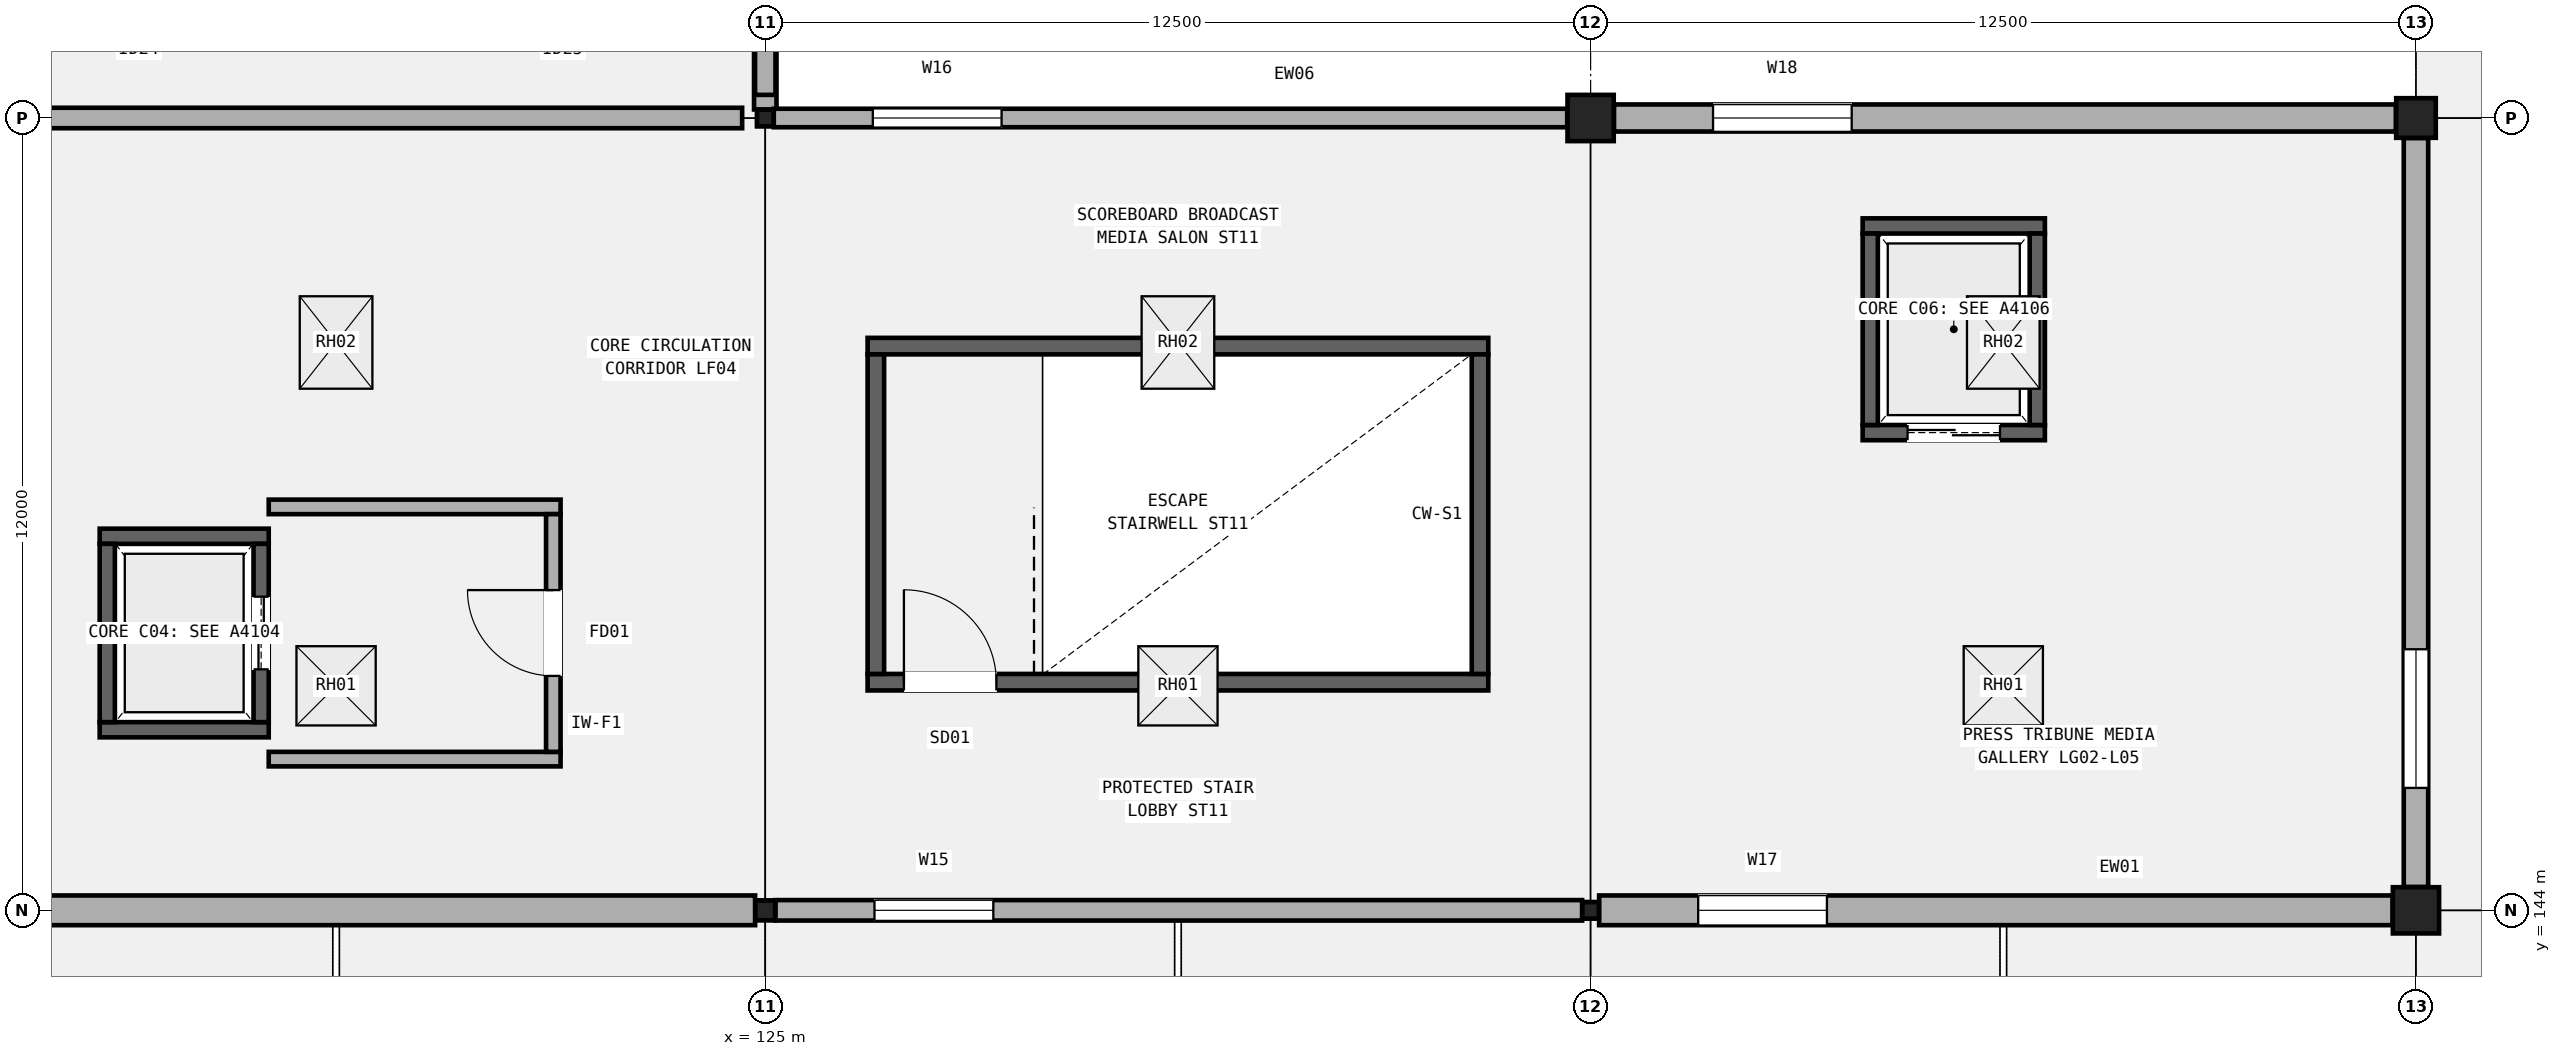
"""IFC4 building model, lengths in metres.
Left out: names, types, materials, properties, quantities, classifications, styles, units other than length and angle.
Written with IfcOpenShell. Run it as: python <this file> out.ifc"""

import sys

from ifc_helpers import new_model, si_unit, direction, frame, frame_2d, origin, origin_2d, place, context, subcontext, project, spatial, rectangle, hollow_rectangle, extrude, element, fill, save


model = new_model("IFC4")
c1 = context("Model", 3, precision=1e-05, world=origin(), true_north=direction((0.0, 1.0)))
c2 = subcontext(c1, "Body", "Model", "MODEL_VIEW")
j1 = project(units=[si_unit("LENGTHUNIT", "METRE"), si_unit("PLANEANGLEUNIT", "RADIAN")], contexts=[c1])
p1 = place(None, origin())
s1 = spatial("IfcSite", under=j1, at=p1, CompositionType="ELEMENT")
p2 = place(p1, origin())
s2 = spatial("IfcBuilding", under=s1, at=p2, CompositionType="ELEMENT")
p3 = place(p2, frame((0.0, 0.0, 25.8)))
s3 = spatial("IfcBuildingStorey", under=s2, at=p3, CompositionType="ELEMENT", Elevation=25.8)
p4 = place(p3, frame((125.0, 144.0, 0.0), z_axis=(0.0, 0.0, 1.0), x_axis=(1.0, 0.0, 0.0)))
e1 = element("IfcColumn", 1, at=p4, inside=s3, PredefinedType="COLUMN", context=c2, shape_type="SweptSolid", body=[
    extrude(hollow_rectangle(XDim=0.3, YDim=0.3, WallThickness=0.012, InnerFilletRadius=0.012, OuterFilletRadius=0.024, at=origin_2d()), origin(), (0.0, 0.0, 1.0), 5.4),
])
for number, where, z_axis, x_axis in (
    (2, (125.0, 156.0, 0.0), (0.0, 0.0, 1.0), (1.0, 0.0, 0.0)),
    (3, (137.5, 144.0, 0.0), (0.0, 0.0, 1.0), (1.0, 0.0, 0.0)),
):
    element("IfcColumn", number, at=place(p3, frame(where, z_axis=z_axis, x_axis=x_axis)), inside=s3, PredefinedType="COLUMN", context=c2, shape_type="SweptSolid", body=[
        extrude(hollow_rectangle(XDim=0.25, YDim=0.25, WallThickness=0.012, InnerFilletRadius=0.012, OuterFilletRadius=0.024, at=origin_2d()), origin(), (0.0, 0.0, 1.0), 5.4),
    ])
for number, where, z_axis, x_axis in (
    (4, (137.5, 156.0, 0.0), (0.0, 0.0, 1.0), (1.0, 0.0, 0.0)),
    (5, (150.0, 144.0, 0.0), (0.0, 0.0, 1.0), (1.0, 0.0, 0.0)),
):
    element("IfcColumn", number, at=place(p3, frame(where, z_axis=z_axis, x_axis=x_axis)), inside=s3, PredefinedType="COLUMN", context=c2, shape_type="SweptSolid", body=[
        extrude(rectangle(XDim=0.7, YDim=0.7, at=origin_2d()), origin(), (0.0, 0.0, 1.0), 5.4),
    ])
p5 = place(p3, frame((150.0, 156.0, 0.0), z_axis=(0.0, 0.0, 1.0), x_axis=(1.0, 0.0, 0.0)))
e6 = element("IfcColumn", 6, at=p5, inside=s3, PredefinedType="COLUMN", context=c2, shape_type="SweptSolid", body=[
    extrude(rectangle(XDim=0.6, YDim=0.6, at=origin_2d()), origin(), (0.0, 0.0, 1.0), 5.4),
])
p6 = place(p3, frame((112.179, 144.0, 0.0), z_axis=(0.0, 0.0, 1.0), x_axis=(1.0, 0.0, 0.0)))
e7 = element("IfcWall", 7, at=p6, inside=s3, PredefinedType="SOLIDWALL", context=c2, shape_type="SweptSolid", body=[
    extrude(rectangle(XDim=12.667, YDim=0.45, at=frame_2d((6.333, 0.0))), origin(), (0.0, 0.0, 1.0), 4.13),
])
p7 = place(p3, frame((125.0, 156.129, 0.0), z_axis=(0.0, 0.0, 1.0), x_axis=(0.0, 1.0, 0.0)))
e8 = element("IfcWall", 8, at=p7, inside=s3, PredefinedType="SOLIDWALL", context=c2, shape_type="SweptSolid", body=[
    extrude(rectangle(XDim=11.517, YDim=0.34, at=frame_2d((5.759, 0.0))), origin(), (0.0, 0.0, 1.0), 4.452),
])
p8 = place(p7, frame((2.391, 0.0, 0.95)))
e9 = element("IfcOpeningElement", 9, at=p8, cuts=e8, PredefinedType="OPENING", context=c2, shape_type="SweptSolid", body=[
    extrude(rectangle(XDim=1.8, YDim=2.15, at=frame_2d((0.9, 1.075))), frame((0.0, 0.18, 0.0), z_axis=(0.0, -1.0, 0.0), x_axis=(1.0, 0.0, 0.0)), (0.0, 0.0, 1.0), 0.36),
])
p9 = place(p3, frame((125.154, 144.0, 0.0), z_axis=(0.0, 0.0, 1.0), x_axis=(1.0, 0.0, 0.0)))
e10 = element("IfcWall", 10, at=p9, inside=s3, PredefinedType="SOLIDWALL", context=c2, shape_type="SweptSolid", body=[
    extrude(rectangle(XDim=12.217, YDim=0.31, at=frame_2d((6.108, 0.0))), origin(), (0.0, 0.0, 1.0), 4.13),
])
p10 = place(p9, frame((1.5, 0.0, 0.95)))
e11 = element("IfcOpeningElement", 11, at=p10, cuts=e10, PredefinedType="OPENING", context=c2, shape_type="SweptSolid", body=[
    extrude(rectangle(XDim=1.8, YDim=2.55, at=frame_2d((0.9, 1.275))), frame((0.0, 0.165, 0.0), z_axis=(0.0, -1.0, 0.0), x_axis=(1.0, 0.0, 0.0)), (0.0, 0.0, 1.0), 0.33),
])
p11 = place(p3, frame((125.129, 156.0, 0.0), z_axis=(0.0, 0.0, 1.0), x_axis=(1.0, 0.0, 0.0)))
e12 = element("IfcWall", 12, at=p11, inside=s3, PredefinedType="SOLIDWALL", context=c2, shape_type="SweptSolid", body=[
    extrude(rectangle(XDim=12.017, YDim=0.28, at=frame_2d((6.009, 0.0))), origin(), (0.0, 0.0, 1.0), 4.452),
])
p12 = place(p11, frame((1.5, 0.0, 0.95)))
e13 = element("IfcOpeningElement", 13, at=p12, cuts=e12, PredefinedType="OPENING", context=c2, shape_type="SweptSolid", body=[
    extrude(rectangle(XDim=1.95, YDim=1.9, at=frame_2d((0.975, 0.95))), frame((0.0, 0.15, 0.0), z_axis=(0.0, -1.0, 0.0), x_axis=(1.0, 0.0, 0.0)), (0.0, 0.0, 1.0), 0.3),
])
p13 = place(p3, frame((137.629, 144.0, 0.0), z_axis=(0.0, 0.0, 1.0), x_axis=(1.0, 0.0, 0.0)))
e14 = element("IfcWall", 14, at=p13, inside=s3, PredefinedType="SOLIDWALL", context=c2, shape_type="SweptSolid", body=[
    extrude(rectangle(XDim=12.017, YDim=0.45, at=frame_2d((6.009, 0.0))), origin(), (0.0, 0.0, 1.0), 4.13),
])
p14 = place(p13, frame((1.5, 0.0, 0.95)))
e15 = element("IfcOpeningElement", 15, at=p14, cuts=e14, PredefinedType="OPENING", context=c2, shape_type="SweptSolid", body=[
    extrude(rectangle(XDim=1.95, YDim=2.35, at=frame_2d((0.975, 1.175))), frame((0.0, 0.235, 0.0), z_axis=(0.0, -1.0, 0.0), x_axis=(1.0, 0.0, 0.0)), (0.0, 0.0, 1.0), 0.47),
])
p15 = place(p3, frame((137.854, 156.0, 0.0), z_axis=(0.0, 0.0, 1.0), x_axis=(1.0, 0.0, 0.0)))
e16 = element("IfcWall", 16, at=p15, inside=s3, PredefinedType="SOLIDWALL", context=c2, shape_type="SweptSolid", body=[
    extrude(rectangle(XDim=11.842, YDim=0.41, at=frame_2d((5.921, 0.0))), origin(), (0.0, 0.0, 1.0), 4.34),
])
p16 = place(p15, frame((1.5, 0.0, 0.95)))
e17 = element("IfcOpeningElement", 17, at=p16, cuts=e16, PredefinedType="OPENING", context=c2, shape_type="SweptSolid", body=[
    extrude(rectangle(XDim=2.1, YDim=1.85, at=frame_2d((1.05, 0.925))), frame((0.0, 0.215, 0.0), z_axis=(0.0, -1.0, 0.0), x_axis=(1.0, 0.0, 0.0)), (0.0, 0.0, 1.0), 0.43),
])
p17 = place(p3, frame((150.0, 144.354, 0.0), z_axis=(0.0, 0.0, 1.0), x_axis=(0.0, 1.0, 0.0)))
e18 = element("IfcWall", 18, at=p17, inside=s3, PredefinedType="SOLIDWALL", context=c2, shape_type="SweptSolid", body=[
    extrude(rectangle(XDim=11.342, YDim=0.37, at=frame_2d((5.671, 0.0))), origin(), (0.0, 0.0, 1.0), 4.34),
])
p18 = place(p17, frame((1.5, 0.0, 0.95)))
e19 = element("IfcOpeningElement", 19, at=p18, cuts=e18, PredefinedType="OPENING", context=c2, shape_type="SweptSolid", body=[
    extrude(rectangle(XDim=2.1, YDim=2.25, at=frame_2d((1.05, 1.125))), frame((0.0, 0.195, 0.0), z_axis=(0.0, -1.0, 0.0), x_axis=(1.0, 0.0, 0.0)), (0.0, 0.0, 1.0), 0.39),
])
p19 = place(p3, frame((112.35, 156.0, 5.4), z_axis=(0.0, 0.0, 1.0), x_axis=(1.0, 0.0, 0.0)))
e20 = element("IfcWall", 20, at=p19, inside=s3, PredefinedType="SOLIDWALL", context=c2, shape_type="SweptSolid", body=[
    extrude(rectangle(XDim=12.3, YDim=0.31, at=frame_2d((6.15, 0.0))), origin(), (0.0, 0.0, 1.0), 0.88),
])
p20 = place(p3, frame((125.0, 156.35, 5.4), z_axis=(0.0, 0.0, 1.0), x_axis=(0.0, 1.0, 0.0)))
e21 = element("IfcWall", 21, at=p20, inside=s3, PredefinedType="SOLIDWALL", context=c2, shape_type="SweptSolid", body=[
    extrude(rectangle(XDim=11.3, YDim=0.31, at=frame_2d((5.65, 0.0))), origin(), (0.0, 0.0, 1.0), 0.88),
])
p21 = place(p3, frame((126.55, 147.455, 0.0), z_axis=(0.0, 0.0, 1.0), x_axis=(1.0, 0.0, 0.0)))
e22 = element("IfcWall", 22, at=p21, inside=s3, PredefinedType="SHEAR", context=c2, shape_type="SweptSolid", body=[
    extrude(rectangle(XDim=9.4, YDim=0.25, at=frame_2d((4.7, 0.0))), origin(), (0.0, 0.0, 1.0), 5.04),
])
p22 = place(p21, frame((0.55, 0.0, 0.0)))
e23 = element("IfcOpeningElement", 23, at=p22, cuts=e22, PredefinedType="OPENING", context=c2, shape_type="SweptSolid", body=[
    extrude(rectangle(XDim=1.4, YDim=2.15, at=frame_2d((0.7, 1.075))), frame((0.0, 0.135, 0.0), z_axis=(0.0, -1.0, 0.0), x_axis=(1.0, 0.0, 0.0)), (0.0, 0.0, 1.0), 0.27),
])
p23 = place(p3, frame((126.55, 152.545, 0.0), z_axis=(0.0, 0.0, 1.0), x_axis=(1.0, 0.0, 0.0)))
e24 = element("IfcWall", 24, at=p23, inside=s3, PredefinedType="SHEAR", context=c2, shape_type="SweptSolid", body=[
    extrude(rectangle(XDim=9.4, YDim=0.25, at=frame_2d((4.7, 0.0))), origin(), (0.0, 0.0, 1.0), 5.04),
])
for number, where, z_axis, x_axis in (
    (25, (126.675, 147.58, 0.0), (0.0, 0.0, 1.0), (0.0, 1.0, 0.0)),
    (26, (135.825, 147.58, 0.0), (0.0, 0.0, 1.0), (0.0, 1.0, 0.0)),
):
    element("IfcWall", number, at=place(p3, frame(where, z_axis=z_axis, x_axis=x_axis)), inside=s3, PredefinedType="SHEAR", context=c2, shape_type="SweptSolid", body=[
        extrude(rectangle(XDim=4.84, YDim=0.25, at=frame_2d((2.42, 0.0))), origin(), (0.0, 0.0, 1.0), 5.04),
    ])
for number, where, z_axis, x_axis in (
    (27, (114.92, 146.735, 0.0), (0.0, 0.0, 1.0), (1.0, 0.0, 0.0)),
    (28, (114.92, 149.665, 0.0), (0.0, 0.0, 1.0), (1.0, 0.0, 0.0)),
):
    element("IfcWall", number, at=place(p3, frame(where, z_axis=z_axis, x_axis=x_axis)), inside=s3, PredefinedType="SHEAR", context=c2, shape_type="SweptSolid", body=[
        extrude(rectangle(XDim=2.56, YDim=0.23, at=frame_2d((1.28, 0.0))), origin(), (0.0, 0.0, 1.0), 5.04),
    ])
p24 = place(p3, frame((115.035, 146.85, 0.0), z_axis=(0.0, 0.0, 1.0), x_axis=(0.0, 1.0, 0.0)))
e29 = element("IfcWall", 29, at=p24, inside=s3, PredefinedType="SHEAR", context=c2, shape_type="SweptSolid", body=[
    extrude(rectangle(XDim=2.7, YDim=0.23, at=frame_2d((1.35, 0.0))), origin(), (0.0, 0.0, 1.0), 5.04),
])
p25 = place(p3, frame((117.365, 146.85, 0.0), z_axis=(0.0, 0.0, 1.0), x_axis=(0.0, 1.0, 0.0)))
e30 = element("IfcWall", 30, at=p25, inside=s3, PredefinedType="SHEAR", context=c2, shape_type="SweptSolid", body=[
    extrude(rectangle(XDim=2.7, YDim=0.23, at=frame_2d((1.35, 0.0))), origin(), (0.0, 0.0, 1.0), 5.04),
])
p26 = place(p25, frame((0.8, 0.0, 0.0)))
e31 = element("IfcOpeningElement", 31, at=p26, cuts=e30, PredefinedType="OPENING", context=c2, shape_type="SweptSolid", body=[
    extrude(rectangle(XDim=1.1, YDim=2.15, at=frame_2d((0.55, 1.075))), frame((0.0, 0.125, 0.0), z_axis=(0.0, -1.0, 0.0), x_axis=(1.0, 0.0, 0.0)), (0.0, 0.0, 1.0), 0.25),
])
for number, where, z_axis, x_axis in (
    (32, (117.48, 146.29, 0.0), (0.0, 0.0, 1.0), (1.0, 0.0, 0.0)),
    (33, (117.48, 150.11, 0.0), (0.0, 0.0, 1.0), (1.0, 0.0, 0.0)),
):
    element("IfcWall", number, at=place(p3, frame(where, z_axis=z_axis, x_axis=x_axis)), inside=s3, PredefinedType="SOLIDWALL", context=c2, shape_type="SweptSolid", body=[
        extrude(rectangle(XDim=4.42, YDim=0.22, at=frame_2d((2.21, 0.0))), origin(), (0.0, 0.0, 1.0), 4.35),
    ])
p27 = place(p3, frame((121.79, 146.4, 0.0), z_axis=(0.0, 0.0, 1.0), x_axis=(0.0, 1.0, 0.0)))
e34 = element("IfcWall", 34, at=p27, inside=s3, PredefinedType="SOLIDWALL", context=c2, shape_type="SweptSolid", body=[
    extrude(rectangle(XDim=3.6, YDim=0.22, at=frame_2d((1.8, 0.0))), origin(), (0.0, 0.0, 1.0), 4.35),
])
p28 = place(p27, frame((1.15, 0.0, 0.0)))
e35 = element("IfcOpeningElement", 35, at=p28, cuts=e34, PredefinedType="OPENING", context=c2, shape_type="SweptSolid", body=[
    extrude(rectangle(XDim=1.3, YDim=2.15, at=frame_2d((0.65, 1.075))), frame((0.0, 0.12, 0.0), z_axis=(0.0, -1.0, 0.0), x_axis=(1.0, 0.0, 0.0)), (0.0, 0.0, 1.0), 0.24),
])
p29 = place(p3, frame((141.62, 151.235, 0.0), z_axis=(0.0, 0.0, 1.0), x_axis=(1.0, 0.0, 0.0)))
e36 = element("IfcWall", 36, at=p29, inside=s3, PredefinedType="SHEAR", context=c2, shape_type="SweptSolid", body=[
    extrude(rectangle(XDim=2.76, YDim=0.23, at=frame_2d((1.38, 0.0))), origin(), (0.0, 0.0, 1.0), 5.04),
])
p30 = place(p29, frame((0.68, 0.0, 0.0)))
e37 = element("IfcOpeningElement", 37, at=p30, cuts=e36, PredefinedType="OPENING", context=c2, shape_type="SweptSolid", body=[
    extrude(rectangle(XDim=1.4, YDim=2.25, at=frame_2d((0.7, 1.125))), frame((0.0, 0.125, 0.0), z_axis=(0.0, -1.0, 0.0), x_axis=(1.0, 0.0, 0.0)), (0.0, 0.0, 1.0), 0.25),
])
p31 = place(p3, frame((141.62, 154.365, 0.0), z_axis=(0.0, 0.0, 1.0), x_axis=(1.0, 0.0, 0.0)))
e38 = element("IfcWall", 38, at=p31, inside=s3, PredefinedType="SHEAR", context=c2, shape_type="SweptSolid", body=[
    extrude(rectangle(XDim=2.76, YDim=0.23, at=frame_2d((1.38, 0.0))), origin(), (0.0, 0.0, 1.0), 5.04),
])
for number, where, z_axis, x_axis in (
    (39, (141.735, 151.35, 0.0), (0.0, 0.0, 1.0), (0.0, 1.0, 0.0)),
    (40, (144.265, 151.35, 0.0), (0.0, 0.0, 1.0), (0.0, 1.0, 0.0)),
):
    element("IfcWall", number, at=place(p3, frame(where, z_axis=z_axis, x_axis=x_axis)), inside=s3, PredefinedType="SHEAR", context=c2, shape_type="SweptSolid", body=[
        extrude(rectangle(XDim=2.9, YDim=0.23, at=frame_2d((1.45, 0.0))), origin(), (0.0, 0.0, 1.0), 5.04),
    ])
p32 = place(p10, origin())
e41 = element("IfcWindow", 41, at=p32, inside=s3, PartitioningType="SINGLE_PANEL", PredefinedType="WINDOW", context=c2, shape_type="SweptSolid", body=[
    extrude(rectangle(XDim=1.8, YDim=2.55, at=frame_2d((0.9, 1.275))), frame((0.0, 0.03, 0.0), z_axis=(0.0, -1.0, 0.0), x_axis=(1.0, 0.0, 0.0)), (0.0, 0.0, 1.0), 0.06),
])
fill(e11, e41)
p33 = place(p12, origin())
e42 = element("IfcWindow", 42, at=p33, inside=s3, PartitioningType="SINGLE_PANEL", PredefinedType="WINDOW", context=c2, shape_type="SweptSolid", body=[
    extrude(rectangle(XDim=1.95, YDim=1.9, at=frame_2d((0.975, 0.95))), frame((0.0, 0.03, 0.0), z_axis=(0.0, -1.0, 0.0), x_axis=(1.0, 0.0, 0.0)), (0.0, 0.0, 1.0), 0.06),
])
fill(e13, e42)
p34 = place(p14, origin())
e43 = element("IfcWindow", 43, at=p34, inside=s3, PartitioningType="SINGLE_PANEL", PredefinedType="WINDOW", context=c2, shape_type="SweptSolid", body=[
    extrude(rectangle(XDim=1.95, YDim=2.35, at=frame_2d((0.975, 1.175))), frame((0.0, 0.03, 0.0), z_axis=(0.0, -1.0, 0.0), x_axis=(1.0, 0.0, 0.0)), (0.0, 0.0, 1.0), 0.06),
])
fill(e15, e43)
p35 = place(p16, origin())
e44 = element("IfcWindow", 44, at=p35, inside=s3, PartitioningType="SINGLE_PANEL", PredefinedType="WINDOW", context=c2, shape_type="SweptSolid", body=[
    extrude(rectangle(XDim=2.1, YDim=1.85, at=frame_2d((1.05, 0.925))), frame((0.0, 0.03, 0.0), z_axis=(0.0, -1.0, 0.0), x_axis=(1.0, 0.0, 0.0)), (0.0, 0.0, 1.0), 0.06),
])
fill(e17, e44)
p36 = place(p18, origin())
e45 = element("IfcWindow", 45, at=p36, inside=s3, PartitioningType="SINGLE_PANEL", PredefinedType="WINDOW", context=c2, shape_type="SweptSolid", body=[
    extrude(rectangle(XDim=2.1, YDim=2.25, at=frame_2d((1.05, 1.125))), frame((0.0, 0.03, 0.0), z_axis=(0.0, -1.0, 0.0), x_axis=(1.0, 0.0, 0.0)), (0.0, 0.0, 1.0), 0.06),
])
fill(e19, e45)
p37 = place(p2, frame((0.0, 0.0, 31.2)))
p38 = place(p37, frame((0.0, 0.0, -0.36)))
p39 = place(p38, frame((118.5, 147.4, 0.0)))
p40 = place(p39, frame((0.0, 0.0, 0.31)))
e46 = element("IfcDoor", 46, at=p40, inside=s3, OperationType="SINGLE_SWING_LEFT", PredefinedType="TRAPDOOR", context=c2, shape_type="SweptSolid", body=[
    extrude(rectangle(XDim=1.2, YDim=1.2, at=origin_2d()), origin(), (0.0, 0.0, 1.0), 0.05),
])
p41 = place(p38, frame((118.5, 152.6, 0.0)))
p42 = place(p41, frame((0.0, 0.0, 0.31)))
e47 = element("IfcDoor", 47, at=p42, inside=s3, OperationType="SINGLE_SWING_LEFT", PredefinedType="TRAPDOOR", context=c2, shape_type="SweptSolid", body=[
    extrude(rectangle(XDim=1.4, YDim=1.1, at=origin_2d()), origin(), (0.0, 0.0, 1.0), 0.05),
])
p43 = place(p37, frame((0.0, 0.0, -0.36)))
p44 = place(p43, frame((131.25, 147.4, 0.0)))
p45 = place(p44, frame((0.0, 0.0, 0.31)))
e48 = element("IfcDoor", 48, at=p45, inside=s3, OperationType="SINGLE_SWING_LEFT", PredefinedType="TRAPDOOR", context=c2, shape_type="SweptSolid", body=[
    extrude(rectangle(XDim=1.2, YDim=1.2, at=origin_2d()), origin(), (0.0, 0.0, 1.0), 0.05),
])
p46 = place(p43, frame((131.25, 152.6, 0.0)))
p47 = place(p46, frame((0.0, 0.0, 0.31)))
e49 = element("IfcDoor", 49, at=p47, inside=s3, OperationType="SINGLE_SWING_LEFT", PredefinedType="TRAPDOOR", context=c2, shape_type="SweptSolid", body=[
    extrude(rectangle(XDim=1.4, YDim=1.1, at=origin_2d()), origin(), (0.0, 0.0, 1.0), 0.05),
])
p48 = place(p37, frame((0.0, 0.0, -0.36)))
p49 = place(p48, frame((143.75, 147.4, 0.0)))
p50 = place(p49, frame((0.0, 0.0, 0.31)))
e50 = element("IfcDoor", 50, at=p50, inside=s3, OperationType="SINGLE_SWING_LEFT", PredefinedType="TRAPDOOR", context=c2, shape_type="SweptSolid", body=[
    extrude(rectangle(XDim=1.2, YDim=1.2, at=origin_2d()), origin(), (0.0, 0.0, 1.0), 0.05),
])
p51 = place(p48, frame((143.75, 152.6, 0.0)))
p52 = place(p51, frame((0.0, 0.0, 0.31)))
e51 = element("IfcDoor", 51, at=p52, inside=s3, OperationType="SINGLE_SWING_LEFT", PredefinedType="TRAPDOOR", context=c2, shape_type="SweptSolid", body=[
    extrude(rectangle(XDim=1.4, YDim=1.1, at=origin_2d()), origin(), (0.0, 0.0, 1.0), 0.05),
])
p53 = place(p22, origin())
e52 = element("IfcDoor", 52, at=p53, inside=s3, OperationType="SINGLE_SWING_LEFT", PredefinedType="DOOR", context=c2, shape_type="SweptSolid", body=[
    extrude(rectangle(XDim=1.4, YDim=2.15, at=frame_2d((0.7, 1.075))), frame((0.0, 0.025, 0.0), z_axis=(0.0, -1.0, 0.0), x_axis=(1.0, 0.0, 0.0)), (0.0, 0.0, 1.0), 0.05),
])
fill(e23, e52)
p54 = place(p26, origin())
e53 = element("IfcDoor", 53, at=p54, inside=s3, OperationType="DOUBLE_DOOR_SLIDING", PredefinedType="DOOR", context=c2, shape_type="SweptSolid", body=[
    extrude(rectangle(XDim=1.1, YDim=2.15, at=frame_2d((0.55, 1.075))), frame((0.0, 0.025, 0.0), z_axis=(0.0, -1.0, 0.0), x_axis=(1.0, 0.0, 0.0)), (0.0, 0.0, 1.0), 0.05),
])
fill(e31, e53)
p55 = place(p28, origin())
e54 = element("IfcDoor", 54, at=p55, inside=s3, OperationType="SINGLE_SWING_RIGHT", PredefinedType="DOOR", context=c2, shape_type="SweptSolid", body=[
    extrude(rectangle(XDim=1.3, YDim=2.15, at=frame_2d((0.65, 1.075))), frame((0.0, 0.025, 0.0), z_axis=(0.0, -1.0, 0.0), x_axis=(1.0, 0.0, 0.0)), (0.0, 0.0, 1.0), 0.05),
])
fill(e35, e54)
p56 = place(p30, origin())
e55 = element("IfcDoor", 55, at=p56, inside=s3, OperationType="DOUBLE_DOOR_SLIDING", PredefinedType="DOOR", context=c2, shape_type="SweptSolid", body=[
    extrude(rectangle(XDim=1.4, YDim=2.25, at=frame_2d((0.7, 1.125))), frame((0.0, 0.025, 0.0), z_axis=(0.0, -1.0, 0.0), x_axis=(1.0, 0.0, 0.0)), (0.0, 0.0, 1.0), 0.05),
])
fill(e37, e55)
save(model, sys.argv[1])
